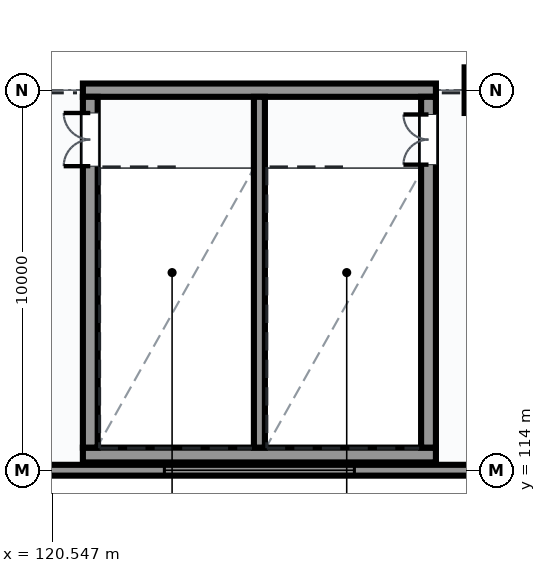
"""IFC4 building model, lengths in metres.
Left out: names, types, materials, properties, quantities, classifications, styles, units other than length and angle.
Written with IfcOpenShell. Run it as: python <this file> out.ifc"""

import sys

from ifc_helpers import new_model, si_unit, direction, frame, frame_2d, origin, origin_2d, place, context, subcontext, project, spatial, rectangle, extrude, element, fill, save


model = new_model("IFC4")
c1 = context("Model", 3, precision=1e-05, world=origin(), true_north=direction((0.0, 1.0)))
c2 = subcontext(c1, "Body", "Model", "MODEL_VIEW")
j1 = project(units=[si_unit("LENGTHUNIT", "METRE"), si_unit("PLANEANGLEUNIT", "RADIAN")], contexts=[c1])
p1 = place(None, origin())
s1 = spatial("IfcSite", under=j1, at=p1, CompositionType="ELEMENT")
p2 = place(p1, origin())
s2 = spatial("IfcBuilding", under=s1, at=p2, CompositionType="ELEMENT")
p3 = place(p2, frame((0.0, 0.0, 24.6)))
s3 = spatial("IfcBuildingStorey", under=s2, at=p3, CompositionType="ELEMENT", Elevation=24.6)
p4 = place(p3, frame((132.0, 124.0, 0.0), z_axis=(0.0, 0.0, 1.0), x_axis=(1.0, 0.0, 0.0)))
e1 = element("IfcColumn", 1, at=p4, inside=s3, PredefinedType="COLUMN", context=c2, shape_type="SweptSolid", body=[
    extrude(rectangle(XDim=1.2, YDim=1.2, at=origin_2d()), origin(), (0.0, 0.0, 1.0), 4.8),
])
p5 = place(p3, frame((120.0, 114.0, 0.0), z_axis=(0.0, 0.0, 1.0), x_axis=(1.0, 0.0, 0.0)))
e2 = element("IfcWall", 2, at=p5, inside=s3, PredefinedType="SOLIDWALL", context=c2, shape_type="SweptSolid", body=[
    extrude(rectangle(XDim=12.0, YDim=0.285, at=frame_2d((6.0, 0.0))), origin(), (0.0, 0.0, 1.0), 3.88),
])
p6 = place(p5, frame((3.5, 0.0, 1.09)))
e3 = element("IfcOpeningElement", 3, at=p6, cuts=e2, PredefinedType="OPENING", context=c2, shape_type="SweptSolid", body=[
    extrude(rectangle(XDim=5.0, YDim=1.7, at=frame_2d((2.5, 0.85))), frame((0.0, 0.152, 0.0), z_axis=(0.0, -1.0, 0.0), x_axis=(1.0, 0.0, 0.0)), (0.0, 0.0, 1.0), 0.305),
])
p7 = place(p3, frame((121.355, 114.4, 0.0), z_axis=(0.0, 0.0, 1.0), x_axis=(1.0, 0.0, 0.0)))
e4 = element("IfcWall", 4, at=p7, inside=s3, PredefinedType="SHEAR", context=c2, shape_type="SweptSolid", body=[
    extrude(rectangle(XDim=9.29, YDim=0.39, at=frame_2d((4.645, 0.0))), origin(), (0.0, 0.0, 1.0), 3.9),
])
p8 = place(p3, frame((121.355, 124.0, 0.0), z_axis=(0.0, 0.0, 1.0), x_axis=(1.0, 0.0, 0.0)))
e5 = element("IfcWall", 5, at=p8, inside=s3, PredefinedType="SHEAR", context=c2, shape_type="SweptSolid", body=[
    extrude(rectangle(XDim=9.29, YDim=0.35, at=frame_2d((4.645, 0.0))), origin(), (0.0, 0.0, 1.0), 3.9),
])
p9 = place(p3, frame((121.55, 114.595, 0.0), z_axis=(0.0, 0.0, 1.0), x_axis=(0.0, 1.0, 0.0)))
e6 = element("IfcWall", 6, at=p9, inside=s3, PredefinedType="SHEAR", context=c2, shape_type="SweptSolid", body=[
    extrude(rectangle(XDim=9.23, YDim=0.39, at=frame_2d((4.615, 0.0))), origin(), (0.0, 0.0, 1.0), 3.9),
])
p10 = place(p9, frame((7.405, 0.0, 0.0)))
e7 = element("IfcOpeningElement", 7, at=p10, cuts=e6, PredefinedType="OPENING", context=c2, shape_type="SweptSolid", body=[
    extrude(rectangle(XDim=1.4, YDim=2.2, at=frame_2d((0.7, 1.1))), frame((0.0, 0.205, 0.0), z_axis=(0.0, -1.0, 0.0), x_axis=(1.0, 0.0, 0.0)), (0.0, 0.0, 1.0), 0.41),
])
p11 = place(p3, frame((130.45, 114.595, 0.0), z_axis=(0.0, 0.0, 1.0), x_axis=(0.0, 1.0, 0.0)))
e8 = element("IfcWall", 8, at=p11, inside=s3, PredefinedType="SHEAR", context=c2, shape_type="SweptSolid", body=[
    extrude(rectangle(XDim=9.23, YDim=0.39, at=frame_2d((4.615, 0.0))), origin(), (0.0, 0.0, 1.0), 3.9),
])
p12 = place(p11, frame((7.445, 0.0, 0.0)))
e9 = element("IfcOpeningElement", 9, at=p12, cuts=e8, PredefinedType="OPENING", context=c2, shape_type="SweptSolid", body=[
    extrude(rectangle(XDim=1.32, YDim=2.2, at=frame_2d((0.66, 1.1))), frame((0.0, 0.205, 0.0), z_axis=(0.0, -1.0, 0.0), x_axis=(1.0, 0.0, 0.0)), (0.0, 0.0, 1.0), 0.41),
])
p13 = place(p3, frame((126.0, 114.595, 0.0), z_axis=(0.0, 0.0, 1.0), x_axis=(0.0, 1.0, 0.0)))
e10 = element("IfcWall", 10, at=p13, inside=s3, PredefinedType="SHEAR", context=c2, shape_type="SweptSolid", body=[
    extrude(rectangle(XDim=9.23, YDim=0.29, at=frame_2d((4.615, 0.0))), origin(), (0.0, 0.0, 1.0), 3.9),
])
p14 = place(p6, origin())
e11 = element("IfcWindow", 11, at=p14, inside=s3, PartitioningType="SINGLE_PANEL", PredefinedType="WINDOW", context=c2, shape_type="SweptSolid", body=[
    extrude(rectangle(XDim=5.0, YDim=1.7, at=frame_2d((2.5, 0.85))), frame((0.0, 0.03, 0.0), z_axis=(0.0, -1.0, 0.0), x_axis=(1.0, 0.0, 0.0)), (0.0, 0.0, 1.0), 0.06),
])
fill(e3, e11)
p15 = place(p10, frame((1.4, 0.0, 0.0), z_axis=(0.0, 0.0, 1.0), x_axis=(-1.0, 0.0, 0.0)))
e12 = element("IfcDoor", 12, at=p15, inside=s3, OperationType="DOUBLE_DOOR_SINGLE_SWING", PredefinedType="DOOR", context=c2, shape_type="SweptSolid", body=[
    extrude(rectangle(XDim=1.4, YDim=2.2, at=frame_2d((0.7, 1.1))), frame((0.0, 0.025, 0.0), z_axis=(0.0, -1.0, 0.0), x_axis=(1.0, 0.0, 0.0)), (0.0, 0.0, 1.0), 0.05),
])
fill(e7, e12)
p16 = place(p12, origin())
e13 = element("IfcDoor", 13, at=p16, inside=s3, OperationType="DOUBLE_DOOR_SINGLE_SWING", PredefinedType="DOOR", context=c2, shape_type="SweptSolid", body=[
    extrude(rectangle(XDim=1.32, YDim=2.2, at=frame_2d((0.66, 1.1))), frame((0.0, 0.025, 0.0), z_axis=(0.0, -1.0, 0.0), x_axis=(1.0, 0.0, 0.0)), (0.0, 0.0, 1.0), 0.05),
])
fill(e9, e13)
save(model, sys.argv[1])
